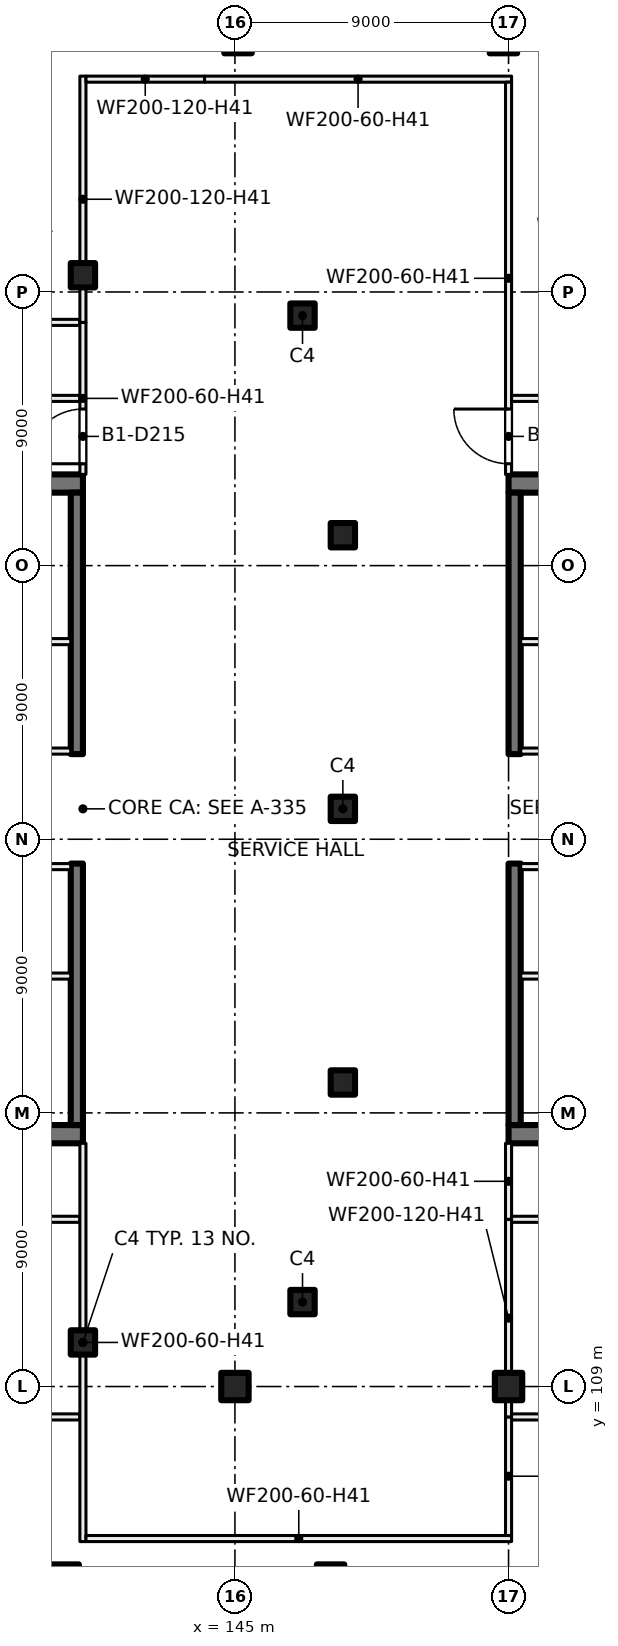
"""IFC4 building model, lengths in metres.
Left out: names, types, materials, properties, quantities, classifications, styles, units other than length and angle.
Written with IfcOpenShell. Run it as: python <this file> out.ifc"""

import sys

from ifc_helpers import new_model, si_unit, direction, frame, frame_2d, origin, origin_2d, place, context, subcontext, project, spatial, rectangle, extrude, element, fill, save


model = new_model("IFC4")
c1 = context("Model", 3, precision=1e-05, world=origin(), true_north=direction((0.0, 1.0)))
c2 = subcontext(c1, "Body", "Model", "MODEL_VIEW")
j1 = project(units=[si_unit("LENGTHUNIT", "METRE"), si_unit("PLANEANGLEUNIT", "RADIAN")], contexts=[c1])
p1 = place(None, origin())
s1 = spatial("IfcSite", under=j1, at=p1, CompositionType="ELEMENT")
p2 = place(p1, origin())
s2 = spatial("IfcBuilding", under=s1, at=p2, CompositionType="ELEMENT")
p3 = place(p2, frame((0.0, 0.0, -4.5)))
s3 = spatial("IfcBuildingStorey", under=s2, at=p3, CompositionType="ELEMENT", Elevation=-4.5)
for number, where, z_axis, x_axis in (
    (1, (145.0, 109.0, 0.0), (0.0, 0.0, 1.0), (1.0, 0.0, 0.0)),
    (2, (154.0, 109.0, 0.0), (0.0, 0.0, 1.0), (1.0, 0.0, 0.0)),
    (3, (145.102, 153.3, 0.0), (0.0, 0.0, 1.0), (1.0, 0.0, 0.0)),
    (4, (153.831, 153.3, 0.0), (0.0, 0.0, 1.0), (1.0, 0.0, 0.0)),
    (5, (148.146, 102.7, 0.0), (0.0, 0.0, 1.0), (1.0, 0.0, 0.0)),
    (6, (139.416, 102.7, 0.0), (0.0, 0.0, 1.0), (1.0, 0.0, 0.0)),
):
    element("IfcColumn", number, at=place(p3, frame(where, z_axis=z_axis, x_axis=x_axis)), inside=s3, PredefinedType="COLUMN", context=c2, shape_type="SweptSolid", body=[
        extrude(rectangle(XDim=0.9, YDim=0.9, at=origin_2d()), origin(), (0.0, 0.0, 1.0), 4.5),
    ])
for number, where, z_axis, x_axis in (
    (7, (148.55, 119.0, 0.0), (0.0, 0.0, 1.0), (1.0, 0.0, 0.0)),
    (8, (148.55, 128.0, 0.0), (0.0, 0.0, 1.0), (1.0, 0.0, 0.0)),
    (9, (148.55, 137.0, 0.0), (0.0, 0.0, 1.0), (1.0, 0.0, 0.0)),
    (10, (140.0, 145.55, 0.0), (0.0, 0.0, 1.0), (1.0, 0.0, 0.0)),
    (11, (147.223, 144.223, 0.0), (0.0, 0.0, 1.0), (1.0, 0.0, 0.0)),
    (12, (140.0, 110.45, 0.0), (0.0, 0.0, 1.0), (1.0, 0.0, 0.0)),
    (13, (147.223, 111.777, 0.0), (0.0, 0.0, 1.0), (1.0, 0.0, 0.0)),
):
    element("IfcColumn", number, at=place(p3, frame(where, z_axis=z_axis, x_axis=x_axis)), inside=s3, PredefinedType="COLUMN", context=c2, shape_type="SweptSolid", body=[
        extrude(rectangle(XDim=0.8, YDim=0.8, at=origin_2d()), origin(), (0.0, 0.0, 1.0), 4.5),
    ])
for number, where, z_axis, x_axis in (
    (14, (135.4, 117.3, 0.0), (0.0, 0.0, 1.0), (1.0, 0.0, 0.0)),
    (15, (135.4, 138.7, 0.0), (0.0, 0.0, 1.0), (1.0, 0.0, 0.0)),
):
    element("IfcWall", number, at=place(p3, frame(where, z_axis=z_axis, x_axis=x_axis)), inside=s3, PredefinedType="SHEAR", context=c2, shape_type="SweptSolid", body=[
        extrude(rectangle(XDim=4.6, YDim=0.6, at=frame_2d((2.3, 0.0))), origin(), (0.0, 0.0, 1.0), 4.5),
    ])
for number, where, z_axis, x_axis in (
    (16, (139.8, 117.6, 0.0), (0.0, 0.0, 1.0), (0.0, 1.0, 0.0)),
    (17, (139.8, 129.8, 0.0), (0.0, 0.0, 1.0), (0.0, 1.0, 0.0)),
):
    element("IfcWall", number, at=place(p3, frame(where, z_axis=z_axis, x_axis=x_axis)), inside=s3, PredefinedType="SHEAR", context=c2, shape_type="SweptSolid", body=[
        extrude(rectangle(XDim=8.6, YDim=0.4, at=frame_2d((4.3, 0.0))), origin(), (0.0, 0.0, 1.0), 4.5),
    ])
for number, where, z_axis, x_axis in (
    (18, (158.6, 138.7, 0.0), (0.0, 0.0, 1.0), (-1.0, 0.0, 0.0)),
    (19, (158.6, 117.3, 0.0), (0.0, 0.0, 1.0), (-1.0, 0.0, 0.0)),
):
    element("IfcWall", number, at=place(p3, frame(where, z_axis=z_axis, x_axis=x_axis)), inside=s3, PredefinedType="SHEAR", context=c2, shape_type="SweptSolid", body=[
        extrude(rectangle(XDim=4.6, YDim=0.6, at=frame_2d((2.3, 0.0))), origin(), (0.0, 0.0, 1.0), 4.5),
    ])
for number, where, z_axis, x_axis in (
    (20, (154.2, 138.4, 0.0), (0.0, 0.0, 1.0), (0.0, -1.0, 0.0)),
    (21, (154.2, 126.2, 0.0), (0.0, 0.0, 1.0), (0.0, -1.0, 0.0)),
):
    element("IfcWall", number, at=place(p3, frame(where, z_axis=z_axis, x_axis=x_axis)), inside=s3, PredefinedType="SHEAR", context=c2, shape_type="SweptSolid", body=[
        extrude(rectangle(XDim=8.6, YDim=0.4, at=frame_2d((4.3, 0.0))), origin(), (0.0, 0.0, 1.0), 4.5),
    ])
p4 = place(p3, frame((135.0, 129.9, 0.0), z_axis=(0.0, 0.0, 1.0), x_axis=(1.0, 0.0, 0.0)))
e22 = element("IfcWall", 22, at=p4, inside=s3, PredefinedType="PARTITIONING", context=c2, shape_type="SweptSolid", body=[
    extrude(rectangle(XDim=4.6, YDim=0.2, at=frame_2d((2.3, 0.0))), origin(), (0.0, 0.0, 1.0), 4.1),
])
p5 = place(p4, frame((1.7, 0.0, 0.0)))
e23 = element("IfcOpeningElement", 23, at=p5, cuts=e22, PredefinedType="OPENING", context=c2, shape_type="SweptSolid", body=[
    extrude(rectangle(XDim=1.2, YDim=2.1, at=frame_2d((0.6, 1.05))), frame((0.0, 0.11, 0.0), z_axis=(0.0, -1.0, 0.0), x_axis=(1.0, 0.0, 0.0)), (0.0, 0.0, 1.0), 0.22),
])
p6 = place(p3, frame((135.0, 133.5, 0.0), z_axis=(0.0, 0.0, 1.0), x_axis=(1.0, 0.0, 0.0)))
e24 = element("IfcWall", 24, at=p6, inside=s3, PredefinedType="PARTITIONING", context=c2, shape_type="SweptSolid", body=[
    extrude(rectangle(XDim=4.6, YDim=0.2, at=frame_2d((2.3, 0.0))), origin(), (0.0, 0.0, 1.0), 4.1),
])
p7 = place(p6, frame((1.75, 0.0, 0.0)))
e25 = element("IfcOpeningElement", 25, at=p7, cuts=e24, PredefinedType="OPENING", context=c2, shape_type="SweptSolid", body=[
    extrude(rectangle(XDim=1.5, YDim=2.1, at=frame_2d((0.75, 1.05))), frame((0.0, 0.11, 0.0), z_axis=(0.0, -1.0, 0.0), x_axis=(1.0, 0.0, 0.0)), (0.0, 0.0, 1.0), 0.22),
])
p8 = place(p3, frame((139.6, 126.1, 0.0), z_axis=(0.0, 0.0, 1.0), x_axis=(-1.0, 0.0, 0.0)))
e26 = element("IfcWall", 26, at=p8, inside=s3, PredefinedType="PARTITIONING", context=c2, shape_type="SweptSolid", body=[
    extrude(rectangle(XDim=4.6, YDim=0.2, at=frame_2d((2.3, 0.0))), origin(), (0.0, 0.0, 1.0), 4.1),
])
p9 = place(p8, frame((1.7, 0.0, 0.0)))
e27 = element("IfcOpeningElement", 27, at=p9, cuts=e26, PredefinedType="OPENING", context=c2, shape_type="SweptSolid", body=[
    extrude(rectangle(XDim=1.2, YDim=2.1, at=frame_2d((0.6, 1.05))), frame((0.0, 0.11, 0.0), z_axis=(0.0, -1.0, 0.0), x_axis=(1.0, 0.0, 0.0)), (0.0, 0.0, 1.0), 0.22),
])
p10 = place(p3, frame((139.6, 122.5, 0.0), z_axis=(0.0, 0.0, 1.0), x_axis=(-1.0, 0.0, 0.0)))
e28 = element("IfcWall", 28, at=p10, inside=s3, PredefinedType="PARTITIONING", context=c2, shape_type="SweptSolid", body=[
    extrude(rectangle(XDim=4.6, YDim=0.2, at=frame_2d((2.3, 0.0))), origin(), (0.0, 0.0, 1.0), 4.1),
])
p11 = place(p10, frame((1.35, 0.0, 0.0)))
e29 = element("IfcOpeningElement", 29, at=p11, cuts=e28, PredefinedType="OPENING", context=c2, shape_type="SweptSolid", body=[
    extrude(rectangle(XDim=1.5, YDim=2.1, at=frame_2d((0.75, 1.05))), frame((0.0, 0.11, 0.0), z_axis=(0.0, -1.0, 0.0), x_axis=(1.0, 0.0, 0.0)), (0.0, 0.0, 1.0), 0.22),
])
p12 = place(p3, frame((163.8, 126.1, 0.0), z_axis=(0.0, 0.0, 1.0), x_axis=(-1.0, 0.0, 0.0)))
e30 = element("IfcWall", 30, at=p12, inside=s3, PredefinedType="PARTITIONING", context=c2, shape_type="SweptSolid", body=[
    extrude(rectangle(XDim=9.4, YDim=0.2, at=frame_2d((4.7, 0.0))), origin(), (0.0, 0.0, 1.0), 4.1),
])
p13 = place(p12, frame((4.1, 0.0, 0.0)))
e31 = element("IfcOpeningElement", 31, at=p13, cuts=e30, PredefinedType="OPENING", context=c2, shape_type="SweptSolid", body=[
    extrude(rectangle(XDim=1.2, YDim=2.1, at=frame_2d((0.6, 1.05))), frame((0.0, 0.11, 0.0), z_axis=(0.0, -1.0, 0.0), x_axis=(1.0, 0.0, 0.0)), (0.0, 0.0, 1.0), 0.22),
])
p14 = place(p3, frame((163.8, 122.5, 0.0), z_axis=(0.0, 0.0, 1.0), x_axis=(-1.0, 0.0, 0.0)))
e32 = element("IfcWall", 32, at=p14, inside=s3, PredefinedType="PARTITIONING", context=c2, shape_type="SweptSolid", body=[
    extrude(rectangle(XDim=9.4, YDim=0.2, at=frame_2d((4.7, 0.0))), origin(), (0.0, 0.0, 1.0), 4.1),
])
p15 = place(p14, frame((6.55, 0.0, 0.0)))
e33 = element("IfcOpeningElement", 33, at=p15, cuts=e32, PredefinedType="OPENING", context=c2, shape_type="SweptSolid", body=[
    extrude(rectangle(XDim=1.5, YDim=2.1, at=frame_2d((0.75, 1.05))), frame((0.0, 0.11, 0.0), z_axis=(0.0, -1.0, 0.0), x_axis=(1.0, 0.0, 0.0)), (0.0, 0.0, 1.0), 0.22),
])
p16 = place(p3, frame((154.4, 129.9, 0.0), z_axis=(0.0, 0.0, 1.0), x_axis=(1.0, 0.0, 0.0)))
e34 = element("IfcWall", 34, at=p16, inside=s3, PredefinedType="PARTITIONING", context=c2, shape_type="SweptSolid", body=[
    extrude(rectangle(XDim=9.4, YDim=0.2, at=frame_2d((4.7, 0.0))), origin(), (0.0, 0.0, 1.0), 4.1),
])
p17 = place(p16, frame((4.1, 0.0, 0.0)))
e35 = element("IfcOpeningElement", 35, at=p17, cuts=e34, PredefinedType="OPENING", context=c2, shape_type="SweptSolid", body=[
    extrude(rectangle(XDim=1.2, YDim=2.1, at=frame_2d((0.6, 1.05))), frame((0.0, 0.11, 0.0), z_axis=(0.0, -1.0, 0.0), x_axis=(1.0, 0.0, 0.0)), (0.0, 0.0, 1.0), 0.22),
])
p18 = place(p3, frame((154.4, 133.5, 0.0), z_axis=(0.0, 0.0, 1.0), x_axis=(1.0, 0.0, 0.0)))
e36 = element("IfcWall", 36, at=p18, inside=s3, PredefinedType="PARTITIONING", context=c2, shape_type="SweptSolid", body=[
    extrude(rectangle(XDim=9.4, YDim=0.2, at=frame_2d((4.7, 0.0))), origin(), (0.0, 0.0, 1.0), 4.1),
])
p19 = place(p18, frame((1.35, 0.0, 0.0)))
e37 = element("IfcOpeningElement", 37, at=p19, cuts=e36, PredefinedType="OPENING", context=c2, shape_type="SweptSolid", body=[
    extrude(rectangle(XDim=1.5, YDim=2.1, at=frame_2d((0.75, 1.05))), frame((0.0, 0.11, 0.0), z_axis=(0.0, -1.0, 0.0), x_axis=(1.0, 0.0, 0.0)), (0.0, 0.0, 1.0), 0.22),
])
for number, where, z_axis, x_axis in (
    (38, (126.1, 108.0, 0.0), (0.0, 0.0, 1.0), (1.0, 0.0, 0.0)),
    (39, (126.1, 144.0, 0.0), (0.0, 0.0, 1.0), (1.0, 0.0, 0.0)),
):
    element("IfcWall", number, at=place(p3, frame(where, z_axis=z_axis, x_axis=x_axis)), inside=s3, PredefinedType="PARTITIONING", context=c2, shape_type="SweptSolid", body=[
        extrude(rectangle(XDim=13.8, YDim=0.2, at=frame_2d((6.9, 0.0))), origin(), (0.0, 0.0, 1.0), 4.1),
    ])
p20 = place(p3, frame((139.9, 114.5, 0.0), z_axis=(0.0, 0.0, 1.0), x_axis=(-1.0, 0.0, 0.0)))
e40 = element("IfcWall", 40, at=p20, inside=s3, PredefinedType="PARTITIONING", context=c2, shape_type="SweptSolid", body=[
    extrude(rectangle(XDim=12.902, YDim=0.2, at=frame_2d((6.451, 0.0))), origin(), (0.0, 0.0, 1.0), 4.1),
])
p21 = place(p20, frame((5.9, 0.0, 0.0)))
e41 = element("IfcOpeningElement", 41, at=p21, cuts=e40, PredefinedType="OPENING", context=c2, shape_type="SweptSolid", body=[
    extrude(rectangle(XDim=1.0, YDim=2.1, at=frame_2d((0.5, 1.05))), frame((0.0, 0.11, 0.0), z_axis=(0.0, -1.0, 0.0), x_axis=(1.0, 0.0, 0.0)), (0.0, 0.0, 1.0), 0.22),
])
p22 = place(p3, frame((126.998, 141.5, 0.0), z_axis=(0.0, 0.0, 1.0), x_axis=(1.0, 0.0, 0.0)))
e42 = element("IfcWall", 42, at=p22, inside=s3, PredefinedType="PARTITIONING", context=c2, shape_type="SweptSolid", body=[
    extrude(rectangle(XDim=12.902, YDim=0.2, at=frame_2d((6.451, 0.0))), origin(), (0.0, 0.0, 1.0), 4.1),
])
p23 = place(p22, frame((6.002, 0.0, 0.0)))
e43 = element("IfcOpeningElement", 43, at=p23, cuts=e42, PredefinedType="OPENING", context=c2, shape_type="SweptSolid", body=[
    extrude(rectangle(XDim=1.0, YDim=2.1, at=frame_2d((0.5, 1.05))), frame((0.0, 0.11, 0.0), z_axis=(0.0, -1.0, 0.0), x_axis=(1.0, 0.0, 0.0)), (0.0, 0.0, 1.0), 0.22),
])
p24 = place(p3, frame((140.0, 103.9, 0.0), z_axis=(0.0, 0.0, 1.0), x_axis=(0.0, 1.0, 0.0)))
e44 = element("IfcWall", 44, at=p24, inside=s3, PredefinedType="PARTITIONING", context=c2, shape_type="SweptSolid", body=[
    extrude(rectangle(XDim=13.1, YDim=0.2, at=frame_2d((6.55, 0.0))), origin(), (0.0, 0.0, 1.0), 4.1),
])
p25 = place(p3, frame((140.1, 104.0, 0.0), z_axis=(0.0, 0.0, 1.0), x_axis=(1.0, 0.0, 0.0)))
e45 = element("IfcWall", 45, at=p25, inside=s3, PredefinedType="PARTITIONING", context=c2, shape_type="SweptSolid", body=[
    extrude(rectangle(XDim=14.0, YDim=0.2, at=frame_2d((7.0, 0.0))), origin(), (0.0, 0.0, 1.0), 4.1),
])
p26 = place(p3, frame((140.0, 139.0, 0.0), z_axis=(0.0, 0.0, 1.0), x_axis=(0.0, 1.0, 0.0)))
e46 = element("IfcWall", 46, at=p26, inside=s3, PredefinedType="PARTITIONING", context=c2, shape_type="SweptSolid", body=[
    extrude(rectangle(XDim=5.0, YDim=0.2, at=frame_2d((2.5, 0.0))), origin(), (0.0, 0.0, 1.0), 4.1),
])
p27 = place(p26, frame((0.35, 0.0, 0.0)))
e47 = element("IfcOpeningElement", 47, at=p27, cuts=e46, PredefinedType="OPENING", context=c2, shape_type="SweptSolid", body=[
    extrude(rectangle(XDim=1.8, YDim=2.1, at=frame_2d((0.9, 1.05))), frame((0.0, 0.11, 0.0), z_axis=(0.0, -1.0, 0.0), x_axis=(1.0, 0.0, 0.0)), (0.0, 0.0, 1.0), 0.22),
])
p28 = place(p3, frame((140.0, 144.0, 0.0), z_axis=(0.0, 0.0, 1.0), x_axis=(0.0, 1.0, 0.0)))
e48 = element("IfcWall", 48, at=p28, inside=s3, PredefinedType="PARTITIONING", context=c2, shape_type="SweptSolid", body=[
    extrude(rectangle(XDim=8.1, YDim=0.2, at=frame_2d((4.05, 0.0))), origin(), (0.0, 0.0, 1.0), 4.1),
])
p29 = place(p3, frame((140.1, 152.0, 0.0), z_axis=(0.0, 0.0, 1.0), x_axis=(1.0, 0.0, 0.0)))
e49 = element("IfcWall", 49, at=p29, inside=s3, PredefinedType="PARTITIONING", context=c2, shape_type="SweptSolid", body=[
    extrude(rectangle(XDim=3.9, YDim=0.2, at=frame_2d((1.95, 0.0))), origin(), (0.0, 0.0, 1.0), 4.1),
])
p30 = place(p3, frame((144.0, 152.0, 0.0), z_axis=(0.0, 0.0, 1.0), x_axis=(1.0, 0.0, 0.0)))
e50 = element("IfcWall", 50, at=p30, inside=s3, PredefinedType="PARTITIONING", context=c2, shape_type="SweptSolid", body=[
    extrude(rectangle(XDim=10.1, YDim=0.2, at=frame_2d((5.05, 0.0))), origin(), (0.0, 0.0, 1.0), 4.1),
])
p31 = place(p3, frame((154.0, 104.1, 0.0), z_axis=(0.0, 0.0, 1.0), x_axis=(0.0, 1.0, 0.0)))
e51 = element("IfcWall", 51, at=p31, inside=s3, PredefinedType="PARTITIONING", context=c2, shape_type="SweptSolid", body=[
    extrude(rectangle(XDim=3.9, YDim=0.2, at=frame_2d((1.95, 0.0))), origin(), (0.0, 0.0, 1.0), 4.1),
])
p32 = place(p3, frame((154.0, 108.0, 0.0), z_axis=(0.0, 0.0, 1.0), x_axis=(0.0, 1.0, 0.0)))
e52 = element("IfcWall", 52, at=p32, inside=s3, PredefinedType="PARTITIONING", context=c2, shape_type="SweptSolid", body=[
    extrude(rectangle(XDim=6.5, YDim=0.2, at=frame_2d((3.25, 0.0))), origin(), (0.0, 0.0, 1.0), 4.1),
])
p33 = place(p3, frame((154.1, 108.0, 0.0), z_axis=(0.0, 0.0, 1.0), x_axis=(1.0, 0.0, 0.0)))
e53 = element("IfcWall", 53, at=p33, inside=s3, PredefinedType="PARTITIONING", context=c2, shape_type="SweptSolid", body=[
    extrude(rectangle(XDim=18.469, YDim=0.2, at=frame_2d((9.234, 0.0))), origin(), (0.0, 0.0, 1.0), 4.1),
])
p34 = place(p3, frame((154.0, 114.5, 0.0), z_axis=(0.0, 0.0, 1.0), x_axis=(0.0, 1.0, 0.0)))
e54 = element("IfcWall", 54, at=p34, inside=s3, PredefinedType="PARTITIONING", context=c2, shape_type="SweptSolid", body=[
    extrude(rectangle(XDim=2.5, YDim=0.2, at=frame_2d((1.25, 0.0))), origin(), (0.0, 0.0, 1.0), 4.1),
])
p35 = place(p3, frame((167.002, 114.5, 0.0), z_axis=(0.0, 0.0, 1.0), x_axis=(-1.0, 0.0, 0.0)))
e55 = element("IfcWall", 55, at=p35, inside=s3, PredefinedType="PARTITIONING", context=c2, shape_type="SweptSolid", body=[
    extrude(rectangle(XDim=12.902, YDim=0.2, at=frame_2d((6.451, 0.0))), origin(), (0.0, 0.0, 1.0), 4.1),
])
p36 = place(p35, frame((8.5, 0.0, 0.0)))
e56 = element("IfcOpeningElement", 56, at=p36, cuts=e55, PredefinedType="OPENING", context=c2, shape_type="SweptSolid", body=[
    extrude(rectangle(XDim=1.0, YDim=2.1, at=frame_2d((0.5, 1.05))), frame((0.0, 0.11, 0.0), z_axis=(0.0, -1.0, 0.0), x_axis=(1.0, 0.0, 0.0)), (0.0, 0.0, 1.0), 0.22),
])
p37 = place(p3, frame((154.0, 151.9, 0.0), z_axis=(0.0, 0.0, 1.0), x_axis=(0.0, -1.0, 0.0)))
e57 = element("IfcWall", 57, at=p37, inside=s3, PredefinedType="PARTITIONING", context=c2, shape_type="SweptSolid", body=[
    extrude(rectangle(XDim=12.9, YDim=0.2, at=frame_2d((6.45, 0.0))), origin(), (0.0, 0.0, 1.0), 4.1),
])
p38 = place(p37, frame((10.75, 0.0, 0.0)))
e58 = element("IfcOpeningElement", 58, at=p38, cuts=e57, PredefinedType="OPENING", context=c2, shape_type="SweptSolid", body=[
    extrude(rectangle(XDim=1.8, YDim=2.1, at=frame_2d((0.9, 1.05))), frame((0.0, 0.11, 0.0), z_axis=(0.0, -1.0, 0.0), x_axis=(1.0, 0.0, 0.0)), (0.0, 0.0, 1.0), 0.22),
])
p39 = place(p3, frame((154.1, 141.5, 0.0), z_axis=(0.0, 0.0, 1.0), x_axis=(1.0, 0.0, 0.0)))
e59 = element("IfcWall", 59, at=p39, inside=s3, PredefinedType="PARTITIONING", context=c2, shape_type="SweptSolid", body=[
    extrude(rectangle(XDim=12.902, YDim=0.2, at=frame_2d((6.451, 0.0))), origin(), (0.0, 0.0, 1.0), 4.1),
])
p40 = place(p27, origin())
e60 = element("IfcDoor", 60, at=p40, inside=s3, OperationType="DOUBLE_DOOR_SINGLE_SWING", PredefinedType="DOOR", context=c2, shape_type="SweptSolid", body=[
    extrude(rectangle(XDim=1.8, YDim=2.1, at=frame_2d((0.9, 1.05))), frame((0.0, 0.025, 0.0), z_axis=(0.0, -1.0, 0.0), x_axis=(1.0, 0.0, 0.0)), (0.0, 0.0, 1.0), 0.05),
])
fill(e47, e60)
p41 = place(p38, origin())
e61 = element("IfcDoor", 61, at=p41, inside=s3, OperationType="DOUBLE_DOOR_SINGLE_SWING", PredefinedType="DOOR", context=c2, shape_type="SweptSolid", body=[
    extrude(rectangle(XDim=1.8, YDim=2.1, at=frame_2d((0.9, 1.05))), frame((0.0, 0.025, 0.0), z_axis=(0.0, -1.0, 0.0), x_axis=(1.0, 0.0, 0.0)), (0.0, 0.0, 1.0), 0.05),
])
fill(e58, e61)
save(model, sys.argv[1])
